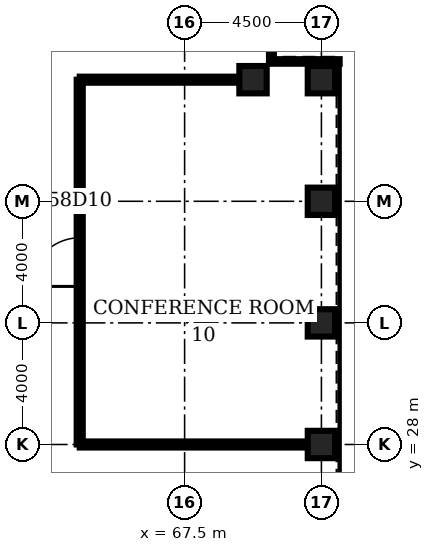
"""IFC4 building model, lengths in metres.
Left out: names, types, materials, properties, quantities, classifications, styles, units other than length and angle.
Written with IfcOpenShell. Run it as: python <this file> out.ifc"""

import sys

from ifc_helpers import new_model, si_unit, direction, frame, frame_2d, origin, origin_2d, place, context, subcontext, project, spatial, rectangle, hollow_rectangle, extrude, element, fill, save


model = new_model("IFC4")
c1 = context("Model", 3, precision=1e-05, world=origin(), true_north=direction((0.0, 1.0)))
c2 = subcontext(c1, "Body", "Model", "MODEL_VIEW")
j1 = project(units=[si_unit("LENGTHUNIT", "METRE"), si_unit("PLANEANGLEUNIT", "RADIAN")], contexts=[c1])
p1 = place(None, origin())
s1 = spatial("IfcSite", under=j1, at=p1, CompositionType="ELEMENT")
p2 = place(p1, origin())
s2 = spatial("IfcBuilding", under=s1, at=p2, CompositionType="ELEMENT")
p3 = place(p2, frame((0.0, 0.0, 257.2)))
s3 = spatial("IfcBuildingStorey", under=s2, at=p3, CompositionType="ELEMENT", Elevation=257.2)
for number, where, z_axis, x_axis in (
    (1, (72.0, 28.0, 0.0), (0.0, 0.0, 1.0), (1.0, 0.0, 0.0)),
    (2, (72.0, 32.0, 0.0), (0.0, 0.0, 1.0), (1.0, 0.0, 0.0)),
    (3, (72.0, 36.0, 0.0), (0.0, 0.0, 1.0), (1.0, 0.0, 0.0)),
    (4, (72.0, 40.0, 0.0), (0.0, 0.0, 1.0), (1.0, 0.0, 0.0)),
    (5, (69.75, 40.0, 0.0), (0.0, 0.0, 1.0), (1.0, 0.0, 0.0)),
):
    element("IfcColumn", number, at=place(p3, frame(where, z_axis=z_axis, x_axis=x_axis)), inside=s3, PredefinedType="COLUMN", context=c2, shape_type="SweptSolid", body=[
        extrude(hollow_rectangle(XDim=0.9, YDim=0.9, WallThickness=0.07, at=origin_2d()), origin(), (0.0, 0.0, 1.0), 4.2),
    ])
p4 = place(p3, frame((64.05, 28.0, 0.0), z_axis=(0.0, 0.0, 1.0), x_axis=(1.0, 0.0, 0.0)))
e6 = element("IfcWall", 6, at=p4, inside=s3, PredefinedType="PARTITIONING", context=c2, shape_type="SweptSolid", body=[
    extrude(rectangle(XDim=7.5, YDim=0.2, at=frame_2d((3.75, 0.0))), origin(), (0.0, 0.0, 1.0), 3.0),
])
p5 = place(p3, frame((64.05, 40.0, 0.0), z_axis=(0.0, 0.0, 1.0), x_axis=(1.0, 0.0, 0.0)))
e7 = element("IfcWall", 7, at=p5, inside=s3, PredefinedType="PARTITIONING", context=c2, shape_type="SweptSolid", body=[
    extrude(rectangle(XDim=5.25, YDim=0.2, at=frame_2d((2.625, 0.0))), origin(), (0.0, 0.0, 1.0), 3.0),
])
p6 = place(p3, frame((64.05, 28.0, 0.0), z_axis=(0.0, 0.0, 1.0), x_axis=(0.0, 1.0, 0.0)))
e8 = element("IfcWall", 8, at=p6, inside=s3, PredefinedType="PARTITIONING", context=c2, shape_type="SweptSolid", body=[
    extrude(rectangle(XDim=12.0, YDim=0.2, at=frame_2d((6.0, 0.0))), origin(), (0.0, 0.0, 1.0), 3.0),
])
p7 = place(p6, frame((5.2, 0.0, 0.0)))
e9 = element("IfcOpeningElement", 9, at=p7, cuts=e8, PredefinedType="OPENING", context=c2, shape_type="SweptSolid", body=[
    extrude(rectangle(XDim=1.6, YDim=2.1, at=frame_2d((0.8, 1.05))), frame((0.0, 0.11, 0.0), z_axis=(0.0, -1.0, 0.0), x_axis=(1.0, 0.0, 0.0)), (0.0, 0.0, 1.0), 0.22),
])
p8 = place(p3, frame((72.6, 40.6, 0.0), z_axis=(0.0, 0.0, 1.0), x_axis=(-1.0, 0.0, 0.0)))
e10 = element("IfcWall", 10, at=p8, inside=s3, PredefinedType="ELEMENTEDWALL", context=c2, shape_type="SweptSolid", body=[
    extrude(rectangle(XDim=2.25, YDim=0.15, at=frame_2d((1.125, 0.0))), origin(), (0.0, 0.0, 1.0), 4.04),
])
p9 = place(p3, frame((70.35, 40.6, 0.0), z_axis=(0.0, 0.0, 1.0), x_axis=(0.0, 1.0, 0.0)))
e11 = element("IfcWall", 11, at=p9, inside=s3, PredefinedType="ELEMENTEDWALL", context=c2, shape_type="SweptSolid", body=[
    extrude(rectangle(XDim=2.0, YDim=0.15, at=frame_2d((1.0, 0.0))), origin(), (0.0, 0.0, 1.0), 4.04),
])
p10 = place(p7, origin())
e12 = element("IfcDoor", 12, at=p10, inside=s3, OperationType="SINGLE_SWING_LEFT", PredefinedType="DOOR", context=c2, shape_type="SweptSolid", body=[
    extrude(rectangle(XDim=1.6, YDim=2.1, at=frame_2d((0.8, 1.05))), frame((0.0, 0.025, 0.0), z_axis=(0.0, -1.0, 0.0), x_axis=(1.0, 0.0, 0.0)), (0.0, 0.0, 1.0), 0.05),
])
fill(e9, e12)
save(model, sys.argv[1])
